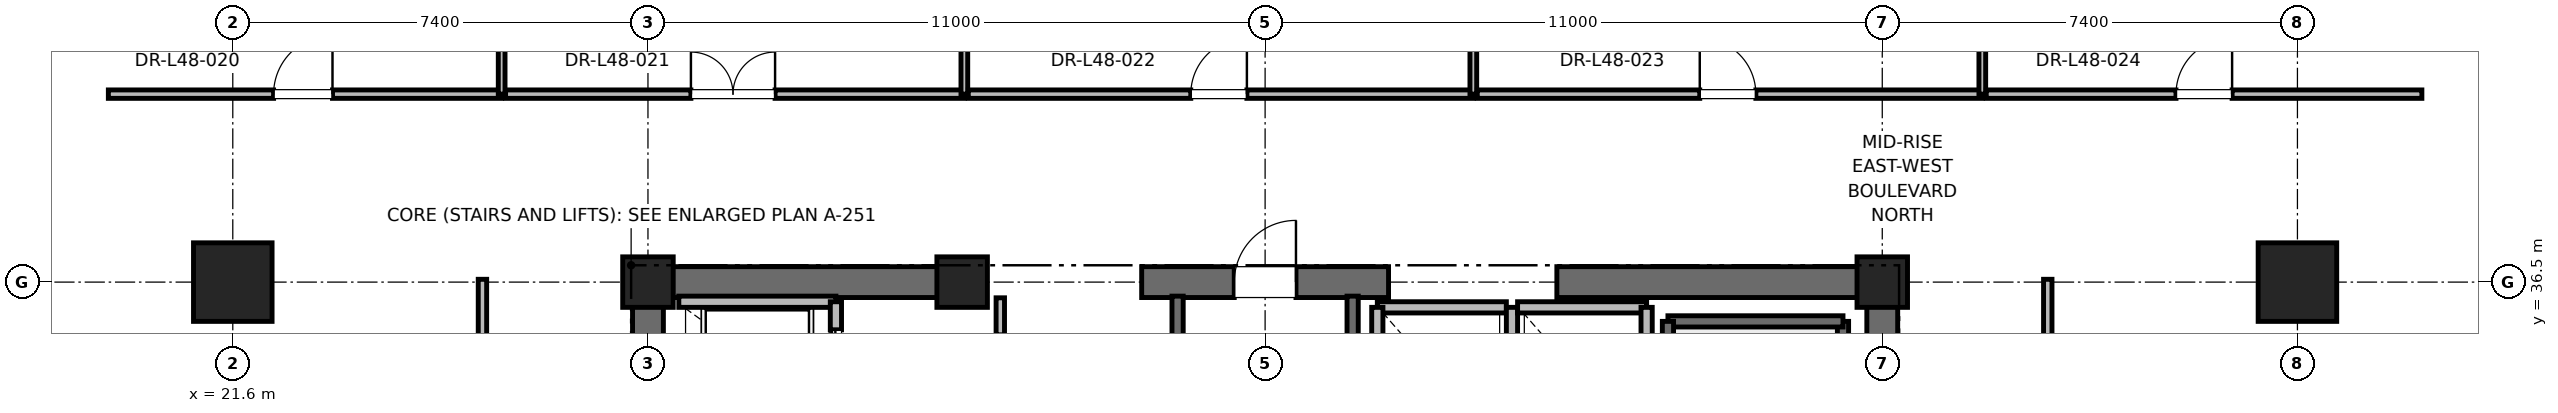
"""IFC4 building model, lengths in metres.
Left out: names, types, materials, properties, quantities, classifications, styles, units other than length and angle.
Written with IfcOpenShell. Run it as: python <this file> out.ifc"""

import sys

from ifc_helpers import new_model, si_unit, direction, frame, frame_2d, origin, origin_2d, place, context, subcontext, project, spatial, rectangle, extrude, element, fill, save


model = new_model("IFC4")
c1 = context("Model", 3, precision=1e-05, world=origin(), true_north=direction((0.0, 1.0)))
c2 = subcontext(c1, "Body", "Model", "MODEL_VIEW")
j1 = project(units=[si_unit("LENGTHUNIT", "METRE"), si_unit("PLANEANGLEUNIT", "RADIAN")], contexts=[c1])
p1 = place(None, origin())
s1 = spatial("IfcSite", under=j1, at=p1, CompositionType="ELEMENT")
p2 = place(p1, origin())
s2 = spatial("IfcBuilding", under=s1, at=p2, CompositionType="ELEMENT")
p3 = place(p2, frame((0.0, 0.0, 209.2)))
s3 = spatial("IfcBuildingStorey", under=s2, at=p3, CompositionType="ELEMENT", Elevation=209.2)
for number, where, z_axis, x_axis in (
    (1, (21.6, 36.5, 0.0), (0.0, 0.0, 1.0), (1.0, 0.0, 0.0)),
    (2, (58.4, 36.5, 0.0), (0.0, 0.0, 1.0), (1.0, 0.0, 0.0)),
):
    element("IfcColumn", number, at=place(p3, frame(where, z_axis=z_axis, x_axis=x_axis)), inside=s3, PredefinedType="COLUMN", context=c2, shape_type="SweptSolid", body=[
        extrude(rectangle(XDim=1.4, YDim=1.4, at=origin_2d()), origin(), (0.0, 0.0, 1.0), 4.0),
    ])
for number, where, z_axis, x_axis in (
    (3, (29.0, 36.5, 0.0), (0.0, 0.0, 1.0), (1.0, 0.0, 0.0)),
    (4, (51.0, 36.5, 0.0), (0.0, 0.0, 1.0), (1.0, 0.0, 0.0)),
    (5, (34.6, 36.5, 0.0), (0.0, 0.0, 1.0), (1.0, 0.0, 0.0)),
):
    element("IfcColumn", number, at=place(p3, frame(where, z_axis=z_axis, x_axis=x_axis)), inside=s3, PredefinedType="PILASTER", context=c2, shape_type="SweptSolid", body=[
        extrude(rectangle(XDim=0.9, YDim=0.9, at=origin_2d()), origin(), (0.0, 0.0, 1.0), 4.0),
    ])
p4 = place(p3, frame((29.0, 36.5, 0.0), z_axis=(0.0, 0.0, 1.0), x_axis=(1.0, 0.0, 0.0)))
e6 = element("IfcWall", 6, at=p4, inside=s3, PredefinedType="SHEAR", context=c2, shape_type="SweptSolid", body=[
    extrude(rectangle(XDim=5.8, YDim=0.55, at=frame_2d((2.9, 0.0))), origin(), (0.0, 0.0, 1.0), 3.775),
])
p5 = place(p3, frame((37.8, 36.5, 0.0), z_axis=(0.0, 0.0, 1.0), x_axis=(1.0, 0.0, 0.0)))
e7 = element("IfcWall", 7, at=p5, inside=s3, PredefinedType="SHEAR", context=c2, shape_type="SweptSolid", body=[
    extrude(rectangle(XDim=4.4, YDim=0.55, at=frame_2d((2.2, 0.0))), origin(), (0.0, 0.0, 1.0), 3.775),
])
p6 = place(p5, frame((1.65, 0.0, 0.0)))
e8 = element("IfcOpeningElement", 8, at=p6, cuts=e7, PredefinedType="OPENING", context=c2, shape_type="SweptSolid", body=[
    extrude(rectangle(XDim=1.1, YDim=2.15, at=frame_2d((0.55, 1.075))), frame((0.0, 0.275, 0.0), z_axis=(0.0, -1.0, 0.0), x_axis=(1.0, 0.0, 0.0)), (0.0, 0.0, 1.0), 0.55),
])
for number, where, z_axis, x_axis in (
    (9, (45.2, 36.5, 0.0), (0.0, 0.0, 1.0), (1.0, 0.0, 0.0)),
    (10, (29.0, 30.7, 0.0), (0.0, 0.0, 1.0), (0.0, 1.0, 0.0)),
):
    element("IfcWall", number, at=place(p3, frame(where, z_axis=z_axis, x_axis=x_axis)), inside=s3, PredefinedType="SHEAR", context=c2, shape_type="SweptSolid", body=[
        extrude(rectangle(XDim=5.8, YDim=0.55, at=frame_2d((2.9, 0.0))), origin(), (0.0, 0.0, 1.0), 3.775),
    ])
p7 = place(p3, frame((51.0, 27.7, 0.0), z_axis=(0.0, 0.0, 1.0), x_axis=(0.0, 1.0, 0.0)))
e11 = element("IfcWall", 11, at=p7, inside=s3, PredefinedType="SHEAR", context=c2, shape_type="SweptSolid", body=[
    extrude(rectangle(XDim=8.8, YDim=0.55, at=frame_2d((4.4, 0.0))), origin(), (0.0, 0.0, 1.0), 3.775),
])
p8 = place(p3, frame((50.3, 27.65, 0.0), z_axis=(0.0, 0.0, 1.0), x_axis=(0.0, 1.0, 0.0)))
e12 = element("IfcWall", 12, at=p8, inside=s3, PredefinedType="SOLIDWALL", context=c2, shape_type="SweptSolid", body=[
    extrude(rectangle(XDim=8.15, YDim=0.2, at=frame_2d((4.075, 0.0))), origin(), (0.0, 0.0, 1.0), 3.775),
])
p9 = place(p3, frame((47.18, 35.8, 0.0), z_axis=(0.0, 0.0, 1.0), x_axis=(1.0, 0.0, 0.0)))
e13 = element("IfcWall", 13, at=p9, inside=s3, PredefinedType="SOLIDWALL", context=c2, shape_type="SweptSolid", body=[
    extrude(rectangle(XDim=3.12, YDim=0.2, at=frame_2d((1.56, 0.0))), origin(), (0.0, 0.0, 1.0), 3.775),
])
p10 = place(p3, frame((47.18, 27.62, 0.0), z_axis=(0.0, 0.0, 1.0), x_axis=(0.0, 1.0, 0.0)))
e14 = element("IfcWall", 14, at=p10, inside=s3, PredefinedType="SOLIDWALL", context=c2, shape_type="SweptSolid", body=[
    extrude(rectangle(XDim=8.18, YDim=0.2, at=frame_2d((4.09, 0.0))), origin(), (0.0, 0.0, 1.0), 3.775),
])
p11 = place(p3, frame((38.44, 27.38, 0.0), z_axis=(0.0, 0.0, 1.0), x_axis=(0.0, 1.0, 0.0)))
e15 = element("IfcWall", 15, at=p11, inside=s3, PredefinedType="SOLIDWALL", context=c2, shape_type="SweptSolid", body=[
    extrude(rectangle(XDim=8.87, YDim=0.2, at=frame_2d((4.435, 0.0))), origin(), (0.0, 0.0, 1.0), 3.775),
])
p12 = place(p3, frame((41.56, 27.68, 0.0), z_axis=(0.0, 0.0, 1.0), x_axis=(0.0, 1.0, 0.0)))
e16 = element("IfcWall", 16, at=p12, inside=s3, PredefinedType="SOLIDWALL", context=c2, shape_type="SweptSolid", body=[
    extrude(rectangle(XDim=8.57, YDim=0.2, at=frame_2d((4.285, 0.0))), origin(), (0.0, 0.0, 1.0), 3.775),
])
p13 = place(p3, frame((32.35, 36.15, 0.0), z_axis=(0.0, 0.0, 1.0), x_axis=(-1.0, 0.0, 0.0)))
e17 = element("IfcWall", 17, at=p13, inside=s3, PredefinedType="SOLIDWALL", context=c2, shape_type="SweptSolid", body=[
    extrude(rectangle(XDim=2.8, YDim=0.2, at=frame_2d((1.4, 0.0))), origin(), (0.0, 0.0, 1.0), 3.062),
])
p14 = place(p3, frame((32.35, 34.05, 0.0), z_axis=(0.0, 0.0, 1.0), x_axis=(0.0, 1.0, 0.0)))
e18 = element("IfcWall", 18, at=p14, inside=s3, PredefinedType="SOLIDWALL", context=c2, shape_type="SweptSolid", body=[
    extrude(rectangle(XDim=2.1, YDim=0.2, at=frame_2d((1.05, 0.0))), origin(), (0.0, 0.0, 1.0), 3.775),
])
p15 = place(p14, frame((0.5, 0.0, 0.0)))
e19 = element("IfcOpeningElement", 19, at=p15, cuts=e18, PredefinedType="OPENING", context=c2, shape_type="SweptSolid", body=[
    extrude(rectangle(XDim=1.1, YDim=2.2, at=frame_2d((0.55, 1.1))), frame((0.0, 0.1, 0.0), z_axis=(0.0, -1.0, 0.0), x_axis=(1.0, 0.0, 0.0)), (0.0, 0.0, 1.0), 0.2),
])
p16 = place(p3, frame((44.3, 36.05, 0.0), z_axis=(0.0, 0.0, 1.0), x_axis=(-1.0, 0.0, 0.0)))
e20 = element("IfcWall", 20, at=p16, inside=s3, PredefinedType="SOLIDWALL", context=c2, shape_type="SweptSolid", body=[
    extrude(rectangle(XDim=2.3, YDim=0.2, at=frame_2d((1.15, 0.0))), origin(), (0.0, 0.0, 1.0), 2.755),
])
for number, where, z_axis, x_axis in (
    (21, (42.0, 36.05, 0.0), (0.0, 0.0, 1.0), (0.0, -1.0, 0.0)),
    (22, (44.4, 33.45, 0.0), (0.0, 0.0, 1.0), (0.0, 1.0, 0.0)),
):
    element("IfcWall", number, at=place(p3, frame(where, z_axis=z_axis, x_axis=x_axis)), inside=s3, PredefinedType="SOLIDWALL", context=c2, shape_type="SweptSolid", body=[
        extrude(rectangle(XDim=2.6, YDim=0.2, at=frame_2d((1.3, 0.0))), origin(), (0.0, 0.0, 1.0), 2.755),
    ])
p17 = place(p3, frame((46.8, 36.05, 0.0), z_axis=(0.0, 0.0, 1.0), x_axis=(-1.0, 0.0, 0.0)))
e23 = element("IfcWall", 23, at=p17, inside=s3, PredefinedType="SOLIDWALL", context=c2, shape_type="SweptSolid", body=[
    extrude(rectangle(XDim=2.3, YDim=0.2, at=frame_2d((1.15, 0.0))), origin(), (0.0, 0.0, 1.0), 2.755),
])
p18 = place(p3, frame((46.8, 33.45, 0.0), z_axis=(0.0, 0.0, 1.0), x_axis=(0.0, 1.0, 0.0)))
e24 = element("IfcWall", 24, at=p18, inside=s3, PredefinedType="SOLIDWALL", context=c2, shape_type="SweptSolid", body=[
    extrude(rectangle(XDim=2.6, YDim=0.2, at=frame_2d((1.3, 0.0))), origin(), (0.0, 0.0, 1.0), 3.775),
])
p19 = place(p3, frame((35.28, 33.95, 0.0), z_axis=(0.0, 0.0, 1.0), x_axis=(0.0, 1.0, 0.0)))
e25 = element("IfcWall", 25, at=p19, inside=s3, PredefinedType="PARTITIONING", context=c2, shape_type="SweptSolid", body=[
    extrude(rectangle(XDim=2.27, YDim=0.15, at=frame_2d((1.135, 0.0))), origin(), (0.0, 0.0, 1.0), 2.755),
])
p20 = place(p19, frame((0.66, 0.0, 0.0)))
e26 = element("IfcOpeningElement", 26, at=p20, cuts=e25, PredefinedType="OPENING", context=c2, shape_type="SweptSolid", body=[
    extrude(rectangle(XDim=0.95, YDim=2.15, at=frame_2d((0.475, 1.075))), frame((0.0, 0.075, 0.0), z_axis=(0.0, -1.0, 0.0), x_axis=(1.0, 0.0, 0.0)), (0.0, 0.0, 1.0), 0.15),
])
p21 = place(p3, frame((19.382, 39.85, 0.0), z_axis=(0.0, 0.0, 1.0), x_axis=(1.0, 0.0, 0.0)))
e27 = element("IfcWall", 27, at=p21, inside=s3, PredefinedType="PARTITIONING", context=c2, shape_type="SweptSolid", body=[
    extrude(rectangle(XDim=7.01, YDim=0.15, at=frame_2d((3.505, 0.0))), origin(), (0.0, 0.0, 1.0), 2.85),
])
p22 = place(p21, frame((2.945, 0.0, 0.0)))
e28 = element("IfcOpeningElement", 28, at=p22, cuts=e27, PredefinedType="OPENING", context=c2, shape_type="SweptSolid", body=[
    extrude(rectangle(XDim=1.05, YDim=2.2, at=frame_2d((0.525, 1.1))), frame((0.0, 0.075, 0.0), z_axis=(0.0, -1.0, 0.0), x_axis=(1.0, 0.0, 0.0)), (0.0, 0.0, 1.0), 0.15),
])
p23 = place(p3, frame((26.392, 39.85, 0.0), z_axis=(0.0, 0.0, 1.0), x_axis=(0.0, 1.0, 0.0)))
e29 = element("IfcWall", 29, at=p23, inside=s3, PredefinedType="PARTITIONING", context=c2, shape_type="SweptSolid", body=[
    extrude(rectangle(XDim=9.292, YDim=0.12, at=frame_2d((4.646, 0.0))), origin(), (0.0, 0.0, 1.0), 2.85),
])
p24 = place(p3, frame((26.462, 39.85, 0.0), z_axis=(0.0, 0.0, 1.0), x_axis=(1.0, 0.0, 0.0)))
e30 = element("IfcWall", 30, at=p24, inside=s3, PredefinedType="PARTITIONING", context=c2, shape_type="SweptSolid", body=[
    extrude(rectangle(XDim=8.177, YDim=0.15, at=frame_2d((4.089, 0.0))), origin(), (0.0, 0.0, 1.0), 2.85),
])
p25 = place(p24, frame((3.303, 0.0, 0.0)))
e31 = element("IfcOpeningElement", 31, at=p25, cuts=e30, PredefinedType="OPENING", context=c2, shape_type="SweptSolid", body=[
    extrude(rectangle(XDim=1.5, YDim=2.25, at=frame_2d((0.75, 1.125))), frame((0.0, 0.075, 0.0), z_axis=(0.0, -1.0, 0.0), x_axis=(1.0, 0.0, 0.0)), (0.0, 0.0, 1.0), 0.15),
])
p26 = place(p3, frame((34.639, 39.85, 0.0), z_axis=(0.0, 0.0, 1.0), x_axis=(0.0, 1.0, 0.0)))
e32 = element("IfcWall", 32, at=p26, inside=s3, PredefinedType="PARTITIONING", context=c2, shape_type="SweptSolid", body=[
    extrude(rectangle(XDim=9.292, YDim=0.12, at=frame_2d((4.646, 0.0))), origin(), (0.0, 0.0, 1.0), 2.405),
])
p27 = place(p3, frame((34.709, 39.85, 0.0), z_axis=(0.0, 0.0, 1.0), x_axis=(1.0, 0.0, 0.0)))
e33 = element("IfcWall", 33, at=p27, inside=s3, PredefinedType="PARTITIONING", context=c2, shape_type="SweptSolid", body=[
    extrude(rectangle(XDim=9.002, YDim=0.15, at=frame_2d((4.501, 0.0))), origin(), (0.0, 0.0, 1.0), 2.85),
])
p28 = place(p27, frame((3.966, 0.0, 0.0)))
e34 = element("IfcOpeningElement", 34, at=p28, cuts=e33, PredefinedType="OPENING", context=c2, shape_type="SweptSolid", body=[
    extrude(rectangle(XDim=1.0, YDim=2.15, at=frame_2d((0.5, 1.075))), frame((0.0, 0.075, 0.0), z_axis=(0.0, -1.0, 0.0), x_axis=(1.0, 0.0, 0.0)), (0.0, 0.0, 1.0), 0.15),
])
p29 = place(p3, frame((43.711, 39.85, 0.0), z_axis=(0.0, 0.0, 1.0), x_axis=(0.0, 1.0, 0.0)))
e35 = element("IfcWall", 35, at=p29, inside=s3, PredefinedType="PARTITIONING", context=c2, shape_type="SweptSolid", body=[
    extrude(rectangle(XDim=9.292, YDim=0.12, at=frame_2d((4.646, 0.0))), origin(), (0.0, 0.0, 1.0), 2.405),
])
p30 = place(p3, frame((43.781, 39.85, 0.0), z_axis=(0.0, 0.0, 1.0), x_axis=(1.0, 0.0, 0.0)))
e36 = element("IfcWall", 36, at=p30, inside=s3, PredefinedType="PARTITIONING", context=c2, shape_type="SweptSolid", body=[
    extrude(rectangle(XDim=9.002, YDim=0.15, at=frame_2d((4.501, 0.0))), origin(), (0.0, 0.0, 1.0), 2.85),
])
p31 = place(p30, frame((3.966, 0.0, 0.0)))
e37 = element("IfcOpeningElement", 37, at=p31, cuts=e36, PredefinedType="OPENING", context=c2, shape_type="SweptSolid", body=[
    extrude(rectangle(XDim=1.0, YDim=2.15, at=frame_2d((0.5, 1.075))), frame((0.0, 0.075, 0.0), z_axis=(0.0, -1.0, 0.0), x_axis=(1.0, 0.0, 0.0)), (0.0, 0.0, 1.0), 0.15),
])
p32 = place(p3, frame((52.783, 39.85, 0.0), z_axis=(0.0, 0.0, 1.0), x_axis=(0.0, 1.0, 0.0)))
e38 = element("IfcWall", 38, at=p32, inside=s3, PredefinedType="PARTITIONING", context=c2, shape_type="SweptSolid", body=[
    extrude(rectangle(XDim=9.292, YDim=0.12, at=frame_2d((4.646, 0.0))), origin(), (0.0, 0.0, 1.0), 2.85),
])
p33 = place(p3, frame((52.853, 39.85, 0.0), z_axis=(0.0, 0.0, 1.0), x_axis=(1.0, 0.0, 0.0)))
e39 = element("IfcWall", 39, at=p33, inside=s3, PredefinedType="PARTITIONING", context=c2, shape_type="SweptSolid", body=[
    extrude(rectangle(XDim=7.765, YDim=0.15, at=frame_2d((3.882, 0.0))), origin(), (0.0, 0.0, 1.0), 2.85),
])
p34 = place(p33, frame((3.382, 0.0, 0.0)))
e40 = element("IfcOpeningElement", 40, at=p34, cuts=e39, PredefinedType="OPENING", context=c2, shape_type="SweptSolid", body=[
    extrude(rectangle(XDim=1.0, YDim=2.15, at=frame_2d((0.5, 1.075))), frame((0.0, 0.075, 0.0), z_axis=(0.0, -1.0, 0.0), x_axis=(1.0, 0.0, 0.0)), (0.0, 0.0, 1.0), 0.15),
])
p35 = place(p3, frame((26.05, 26.122, 0.0), z_axis=(0.0, 0.0, 1.0), x_axis=(0.0, 1.0, 0.0)))
e41 = element("IfcWall", 41, at=p35, inside=s3, PredefinedType="PARTITIONING", context=c2, shape_type="SweptSolid", body=[
    extrude(rectangle(XDim=10.428, YDim=0.15, at=frame_2d((5.214, 0.0))), origin(), (0.0, 0.0, 1.0), 2.85),
])
p36 = place(p35, frame((4.639, 0.0, 0.0)))
e42 = element("IfcOpeningElement", 42, at=p36, cuts=e41, PredefinedType="OPENING", context=c2, shape_type="SweptSolid", body=[
    extrude(rectangle(XDim=1.0, YDim=2.15, at=frame_2d((0.5, 1.075))), frame((0.0, 0.075, 0.0), z_axis=(0.0, -1.0, 0.0), x_axis=(1.0, 0.0, 0.0)), (0.0, 0.0, 1.0), 0.15),
])
p37 = place(p3, frame((53.95, 29.018, 0.0), z_axis=(0.0, 0.0, 1.0), x_axis=(0.0, 1.0, 0.0)))
e43 = element("IfcWall", 43, at=p37, inside=s3, PredefinedType="PARTITIONING", context=c2, shape_type="SweptSolid", body=[
    extrude(rectangle(XDim=7.532, YDim=0.15, at=frame_2d((3.766, 0.0))), origin(), (0.0, 0.0, 1.0), 2.85),
])
p38 = place(p37, frame((3.191, 0.0, 0.0)))
e44 = element("IfcOpeningElement", 44, at=p38, cuts=e43, PredefinedType="OPENING", context=c2, shape_type="SweptSolid", body=[
    extrude(rectangle(XDim=1.0, YDim=2.15, at=frame_2d((0.5, 1.075))), frame((0.0, 0.075, 0.0), z_axis=(0.0, -1.0, 0.0), x_axis=(1.0, 0.0, 0.0)), (0.0, 0.0, 1.0), 0.15),
])
p39 = place(p6, origin())
e45 = element("IfcDoor", 45, at=p39, inside=s3, OperationType="SINGLE_SWING_RIGHT", PredefinedType="DOOR", context=c2, shape_type="SweptSolid", body=[
    extrude(rectangle(XDim=1.1, YDim=2.15, at=frame_2d((0.55, 1.075))), frame((0.0, 0.025, 0.0), z_axis=(0.0, -1.0, 0.0), x_axis=(1.0, 0.0, 0.0)), (0.0, 0.0, 1.0), 0.05),
])
fill(e8, e45)
p40 = place(p15, origin())
e46 = element("IfcDoor", 46, at=p40, inside=s3, OperationType="SLIDING_TO_RIGHT", PredefinedType="DOOR", context=c2, shape_type="SweptSolid", body=[
    extrude(rectangle(XDim=1.1, YDim=2.2, at=frame_2d((0.55, 1.1))), frame((0.0, 0.025, 0.0), z_axis=(0.0, -1.0, 0.0), x_axis=(1.0, 0.0, 0.0)), (0.0, 0.0, 1.0), 0.05),
])
fill(e19, e46)
p41 = place(p22, origin())
e47 = element("IfcDoor", 47, at=p41, inside=s3, OperationType="SINGLE_SWING_RIGHT", PredefinedType="DOOR", context=c2, shape_type="SweptSolid", body=[
    extrude(rectangle(XDim=1.05, YDim=2.2, at=frame_2d((0.525, 1.1))), frame((0.0, 0.025, 0.0), z_axis=(0.0, -1.0, 0.0), x_axis=(1.0, 0.0, 0.0)), (0.0, 0.0, 1.0), 0.05),
])
fill(e28, e47)
p42 = place(p25, origin())
e48 = element("IfcDoor", 48, at=p42, inside=s3, OperationType="DOUBLE_DOOR_SINGLE_SWING", PredefinedType="DOOR", context=c2, shape_type="SweptSolid", body=[
    extrude(rectangle(XDim=1.5, YDim=2.25, at=frame_2d((0.75, 1.125))), frame((0.0, 0.025, 0.0), z_axis=(0.0, -1.0, 0.0), x_axis=(1.0, 0.0, 0.0)), (0.0, 0.0, 1.0), 0.05),
])
fill(e31, e48)
p43 = place(p28, origin())
e49 = element("IfcDoor", 49, at=p43, inside=s3, OperationType="SINGLE_SWING_RIGHT", PredefinedType="DOOR", context=c2, shape_type="SweptSolid", body=[
    extrude(rectangle(XDim=1.0, YDim=2.15, at=frame_2d((0.5, 1.075))), frame((0.0, 0.025, 0.0), z_axis=(0.0, -1.0, 0.0), x_axis=(1.0, 0.0, 0.0)), (0.0, 0.0, 1.0), 0.05),
])
fill(e34, e49)
p44 = place(p31, origin())
e50 = element("IfcDoor", 50, at=p44, inside=s3, OperationType="SINGLE_SWING_LEFT", PredefinedType="DOOR", context=c2, shape_type="SweptSolid", body=[
    extrude(rectangle(XDim=1.0, YDim=2.15, at=frame_2d((0.5, 1.075))), frame((0.0, 0.025, 0.0), z_axis=(0.0, -1.0, 0.0), x_axis=(1.0, 0.0, 0.0)), (0.0, 0.0, 1.0), 0.05),
])
fill(e37, e50)
p45 = place(p34, origin())
e51 = element("IfcDoor", 51, at=p45, inside=s3, OperationType="SINGLE_SWING_RIGHT", PredefinedType="DOOR", context=c2, shape_type="SweptSolid", body=[
    extrude(rectangle(XDim=1.0, YDim=2.15, at=frame_2d((0.5, 1.075))), frame((0.0, 0.025, 0.0), z_axis=(0.0, -1.0, 0.0), x_axis=(1.0, 0.0, 0.0)), (0.0, 0.0, 1.0), 0.05),
])
fill(e40, e51)
save(model, sys.argv[1])
